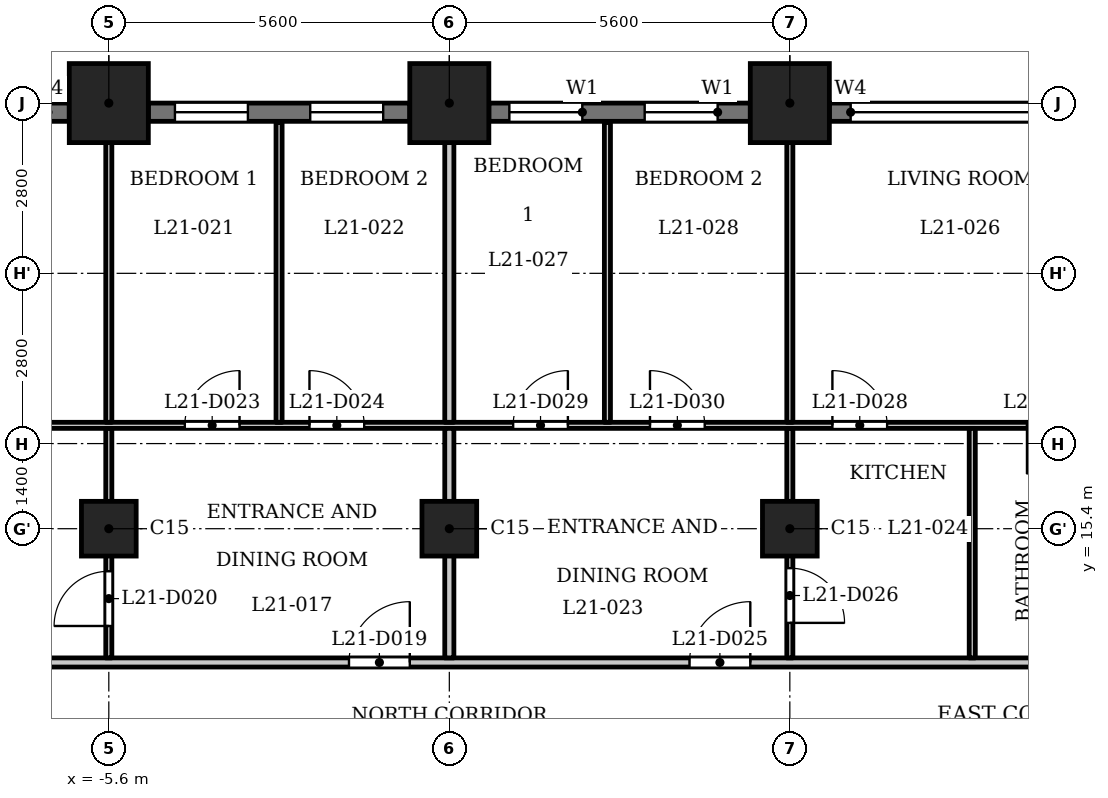
"""IFC4 building model, lengths in metres.
Left out: names, types, materials, properties, quantities, classifications, styles, units other than length and angle.
Written with IfcOpenShell. Run it as: python <this file> out.ifc"""

import sys

from ifc_helpers import new_model, si_unit, direction, frame, frame_2d, origin, origin_2d, place, context, subcontext, project, spatial, rectangle, extrude, element, fill, save


model = new_model("IFC4")
c1 = context("Model", 3, precision=1e-05, world=origin(), true_north=direction((0.0, 1.0)))
c2 = subcontext(c1, "Body", "Model", "MODEL_VIEW")
j1 = project(units=[si_unit("LENGTHUNIT", "METRE"), si_unit("PLANEANGLEUNIT", "RADIAN")], contexts=[c1])
p1 = place(None, origin())
s1 = spatial("IfcSite", under=j1, at=p1, CompositionType="ELEMENT")
p2 = place(p1, origin())
s2 = spatial("IfcBuilding", under=s1, at=p2, CompositionType="ELEMENT")
p3 = place(p2, frame((0.0, 0.0, 86.8)))
s3 = spatial("IfcBuildingStorey", under=s2, at=p3, CompositionType="ELEMENT", Elevation=86.8)
for number, where, z_axis, x_axis in (
    (1, (5.6, 22.4, 0.0), (0.0, 0.0, 1.0), (1.0, 0.0, 0.0)),
    (2, (0.0, 22.4, 0.0), (0.0, 0.0, 1.0), (1.0, 0.0, 0.0)),
    (3, (-5.6, 22.4, 0.0), (0.0, 0.0, 1.0), (1.0, 0.0, 0.0)),
):
    element("IfcColumn", number, at=place(p3, frame(where, z_axis=z_axis, x_axis=x_axis)), inside=s3, PredefinedType="COLUMN", context=c2, shape_type="SweptSolid", body=[
        extrude(rectangle(XDim=1.3, YDim=1.3, at=origin_2d()), origin(), (0.0, 0.0, 1.0), 3.5),
    ])
for number, where, z_axis, x_axis in (
    (4, (-5.6, 15.4, 0.0), (0.0, 0.0, 1.0), (1.0, 0.0, 0.0)),
    (5, (0.0, 15.4, 0.0), (0.0, 0.0, 1.0), (1.0, 0.0, 0.0)),
    (6, (5.6, 15.4, 0.0), (0.0, 0.0, 1.0), (1.0, 0.0, 0.0)),
):
    element("IfcColumn", number, at=place(p3, frame(where, z_axis=z_axis, x_axis=x_axis)), inside=s3, PredefinedType="COLUMN", context=c2, shape_type="SweptSolid", body=[
        extrude(rectangle(XDim=0.9, YDim=0.9, at=origin_2d()), origin(), (0.0, 0.0, 1.0), 3.5),
    ])
p4 = place(p3, frame((10.55, 22.25, 0.0), z_axis=(0.0, 0.0, 1.0), x_axis=(-1.0, 0.0, 0.0)))
e7 = element("IfcWall", 7, at=p4, inside=s3, PredefinedType="SOLIDWALL", context=c2, shape_type="SweptSolid", body=[
    extrude(rectangle(XDim=4.3, YDim=0.3, at=frame_2d((2.15, 0.0))), origin(), (0.0, 0.0, 1.0), 2.4),
])
p5 = place(p4, frame((0.35, 0.0, 1.2)))
e8 = element("IfcOpeningElement", 8, at=p5, cuts=e7, PredefinedType="OPENING", context=c2, shape_type="SweptSolid", body=[
    extrude(rectangle(XDim=3.6, YDim=0.95, at=frame_2d((1.8, 0.475))), frame((0.0, 0.16, 0.0), z_axis=(0.0, -1.0, 0.0), x_axis=(1.0, 0.0, 0.0)), (0.0, 0.0, 1.0), 0.32),
])
p6 = place(p3, frame((4.95, 22.25, 0.0), z_axis=(0.0, 0.0, 1.0), x_axis=(-1.0, 0.0, 0.0)))
e9 = element("IfcWall", 9, at=p6, inside=s3, PredefinedType="SOLIDWALL", context=c2, shape_type="SweptSolid", body=[
    extrude(rectangle(XDim=4.3, YDim=0.3, at=frame_2d((2.15, 0.0))), origin(), (0.0, 0.0, 1.0), 2.4),
])
p7 = place(p6, frame((0.538, 0.0, 0.6)))
e10 = element("IfcOpeningElement", 10, at=p7, cuts=e9, PredefinedType="OPENING", context=c2, shape_type="SweptSolid", body=[
    extrude(rectangle(XDim=1.2, YDim=1.55, at=frame_2d((0.6, 0.775))), frame((0.0, 0.16, 0.0), z_axis=(0.0, -1.0, 0.0), x_axis=(1.0, 0.0, 0.0)), (0.0, 0.0, 1.0), 0.32),
])
p8 = place(p6, frame((2.762, 0.0, 0.6)))
e11 = element("IfcOpeningElement", 11, at=p8, cuts=e9, PredefinedType="OPENING", context=c2, shape_type="SweptSolid", body=[
    extrude(rectangle(XDim=1.2, YDim=1.55, at=frame_2d((0.6, 0.775))), frame((0.0, 0.16, 0.0), z_axis=(0.0, -1.0, 0.0), x_axis=(1.0, 0.0, 0.0)), (0.0, 0.0, 1.0), 0.32),
])
p9 = place(p3, frame((-0.65, 22.25, 0.0), z_axis=(0.0, 0.0, 1.0), x_axis=(-1.0, 0.0, 0.0)))
e12 = element("IfcWall", 12, at=p9, inside=s3, PredefinedType="SOLIDWALL", context=c2, shape_type="SweptSolid", body=[
    extrude(rectangle(XDim=4.3, YDim=0.3, at=frame_2d((2.15, 0.0))), origin(), (0.0, 0.0, 1.0), 2.4),
])
p10 = place(p9, frame((0.438, 0.0, 0.6)))
e13 = element("IfcOpeningElement", 13, at=p10, cuts=e12, PredefinedType="OPENING", context=c2, shape_type="SweptSolid", body=[
    extrude(rectangle(XDim=1.2, YDim=1.55, at=frame_2d((0.6, 0.775))), frame((0.0, 0.16, 0.0), z_axis=(0.0, -1.0, 0.0), x_axis=(1.0, 0.0, 0.0)), (0.0, 0.0, 1.0), 0.32),
])
p11 = place(p9, frame((2.663, 0.0, 0.6)))
e14 = element("IfcOpeningElement", 14, at=p11, cuts=e12, PredefinedType="OPENING", context=c2, shape_type="SweptSolid", body=[
    extrude(rectangle(XDim=1.2, YDim=1.55, at=frame_2d((0.6, 0.775))), frame((0.0, 0.16, 0.0), z_axis=(0.0, -1.0, 0.0), x_axis=(1.0, 0.0, 0.0)), (0.0, 0.0, 1.0), 0.32),
])
p12 = place(p3, frame((-6.25, 22.25, 0.0), z_axis=(0.0, 0.0, 1.0), x_axis=(-1.0, 0.0, 0.0)))
e15 = element("IfcWall", 15, at=p12, inside=s3, PredefinedType="SOLIDWALL", context=c2, shape_type="SweptSolid", body=[
    extrude(rectangle(XDim=4.3, YDim=0.3, at=frame_2d((2.15, 0.0))), origin(), (0.0, 0.0, 1.0), 2.4),
])
p13 = place(p12, frame((0.35, 0.0, 1.2)))
e16 = element("IfcOpeningElement", 16, at=p13, cuts=e15, PredefinedType="OPENING", context=c2, shape_type="SweptSolid", body=[
    extrude(rectangle(XDim=3.6, YDim=0.95, at=frame_2d((1.8, 0.475))), frame((0.0, 0.16, 0.0), z_axis=(0.0, -1.0, 0.0), x_axis=(1.0, 0.0, 0.0)), (0.0, 0.0, 1.0), 0.32),
])
p14 = place(p3, frame((-17.4, 13.2, 0.0), z_axis=(0.0, 0.0, 1.0), x_axis=(1.0, 0.0, 0.0)))
e17 = element("IfcWall", 17, at=p14, inside=s3, PredefinedType="PARTITIONING", context=c2, shape_type="SweptSolid", body=[
    extrude(rectangle(XDim=34.8, YDim=0.15, at=frame_2d((17.4, 0.0))), origin(), (0.0, 0.0, 1.0), 3.2),
])
p15 = place(p14, frame((0.25, 0.0, 0.0)))
e18 = element("IfcOpeningElement", 18, at=p15, cuts=e17, PredefinedType="OPENING", context=c2, shape_type="SweptSolid", body=[
    extrude(rectangle(XDim=1.0, YDim=2.1, at=frame_2d((0.5, 1.05))), frame((0.0, 0.085, 0.0), z_axis=(0.0, -1.0, 0.0), x_axis=(1.0, 0.0, 0.0)), (0.0, 0.0, 1.0), 0.17),
])
p16 = place(p14, frame((33.65, 0.0, 0.0)))
e19 = element("IfcOpeningElement", 19, at=p16, cuts=e17, PredefinedType="OPENING", context=c2, shape_type="SweptSolid", body=[
    extrude(rectangle(XDim=1.0, YDim=2.1, at=frame_2d((0.5, 1.05))), frame((0.0, 0.085, 0.0), z_axis=(0.0, -1.0, 0.0), x_axis=(1.0, 0.0, 0.0)), (0.0, 0.0, 1.0), 0.17),
])
p17 = place(p14, frame((15.75, 0.0, 0.0)))
e20 = element("IfcOpeningElement", 20, at=p17, cuts=e17, PredefinedType="OPENING", context=c2, shape_type="SweptSolid", body=[
    extrude(rectangle(XDim=1.0, YDim=2.1, at=frame_2d((0.5, 1.05))), frame((0.0, 0.085, 0.0), z_axis=(0.0, -1.0, 0.0), x_axis=(1.0, 0.0, 0.0)), (0.0, 0.0, 1.0), 0.17),
])
p18 = place(p14, frame((21.35, 0.0, 0.0)))
e21 = element("IfcOpeningElement", 21, at=p18, cuts=e17, PredefinedType="OPENING", context=c2, shape_type="SweptSolid", body=[
    extrude(rectangle(XDim=1.0, YDim=2.1, at=frame_2d((0.5, 1.05))), frame((0.0, 0.085, 0.0), z_axis=(0.0, -1.0, 0.0), x_axis=(1.0, 0.0, 0.0)), (0.0, 0.0, 1.0), 0.17),
])
p19 = place(p3, frame((-16.725, 17.1, 0.0), z_axis=(0.0, 0.0, 1.0), x_axis=(1.0, 0.0, 0.0)))
e22 = element("IfcWall", 22, at=p19, inside=s3, PredefinedType="PARTITIONING", context=c2, shape_type="SweptSolid", body=[
    extrude(rectangle(XDim=33.45, YDim=0.1, at=frame_2d((16.725, 0.0))), origin(), (0.0, 0.0, 1.0), 3.2),
])
p20 = place(p19, frame((3.925, 0.0, 0.0)))
e23 = element("IfcOpeningElement", 23, at=p20, cuts=e22, PredefinedType="OPENING", context=c2, shape_type="SweptSolid", body=[
    extrude(rectangle(XDim=0.8, YDim=2.1, at=frame_2d((0.4, 1.05))), frame((0.0, 0.06, 0.0), z_axis=(0.0, -1.0, 0.0), x_axis=(1.0, 0.0, 0.0)), (0.0, 0.0, 1.0), 0.12),
])
p21 = place(p19, frame((0.975, 0.0, 0.0)))
e24 = element("IfcOpeningElement", 24, at=p21, cuts=e22, PredefinedType="OPENING", context=c2, shape_type="SweptSolid", body=[
    extrude(rectangle(XDim=0.9, YDim=2.1, at=frame_2d((0.45, 1.05))), frame((0.0, 0.06, 0.0), z_axis=(0.0, -1.0, 0.0), x_axis=(1.0, 0.0, 0.0)), (0.0, 0.0, 1.0), 0.12),
])
p22 = place(p19, frame((6.425, 0.0, 0.0)))
e25 = element("IfcOpeningElement", 25, at=p22, cuts=e22, PredefinedType="OPENING", context=c2, shape_type="SweptSolid", body=[
    extrude(rectangle(XDim=0.8, YDim=2.1, at=frame_2d((0.4, 1.05))), frame((0.0, 0.06, 0.0), z_axis=(0.0, -1.0, 0.0), x_axis=(1.0, 0.0, 0.0)), (0.0, 0.0, 1.0), 0.12),
])
p23 = place(p19, frame((8.825, 0.0, 0.0)))
e26 = element("IfcOpeningElement", 26, at=p23, cuts=e22, PredefinedType="OPENING", context=c2, shape_type="SweptSolid", body=[
    extrude(rectangle(XDim=0.9, YDim=2.1, at=frame_2d((0.45, 1.05))), frame((0.0, 0.06, 0.0), z_axis=(0.0, -1.0, 0.0), x_axis=(1.0, 0.0, 0.0)), (0.0, 0.0, 1.0), 0.12),
])
p24 = place(p19, frame((12.375, 0.0, 0.0)))
e27 = element("IfcOpeningElement", 27, at=p24, cuts=e22, PredefinedType="OPENING", context=c2, shape_type="SweptSolid", body=[
    extrude(rectangle(XDim=0.9, YDim=2.1, at=frame_2d((0.45, 1.05))), frame((0.0, 0.06, 0.0), z_axis=(0.0, -1.0, 0.0), x_axis=(1.0, 0.0, 0.0)), (0.0, 0.0, 1.0), 0.12),
])
p25 = place(p19, frame((14.425, 0.0, 0.0)))
e28 = element("IfcOpeningElement", 28, at=p25, cuts=e22, PredefinedType="OPENING", context=c2, shape_type="SweptSolid", body=[
    extrude(rectangle(XDim=0.9, YDim=2.1, at=frame_2d((0.45, 1.05))), frame((0.0, 0.06, 0.0), z_axis=(0.0, -1.0, 0.0), x_axis=(1.0, 0.0, 0.0)), (0.0, 0.0, 1.0), 0.12),
])
p26 = place(p19, frame((26.225, 0.0, 0.0)))
e29 = element("IfcOpeningElement", 29, at=p26, cuts=e22, PredefinedType="OPENING", context=c2, shape_type="SweptSolid", body=[
    extrude(rectangle(XDim=0.8, YDim=2.1, at=frame_2d((0.4, 1.05))), frame((0.0, 0.06, 0.0), z_axis=(0.0, -1.0, 0.0), x_axis=(1.0, 0.0, 0.0)), (0.0, 0.0, 1.0), 0.12),
])
p27 = place(p19, frame((23.025, 0.0, 0.0)))
e30 = element("IfcOpeningElement", 30, at=p27, cuts=e22, PredefinedType="OPENING", context=c2, shape_type="SweptSolid", body=[
    extrude(rectangle(XDim=0.9, YDim=2.1, at=frame_2d((0.45, 1.05))), frame((0.0, 0.06, 0.0), z_axis=(0.0, -1.0, 0.0), x_axis=(1.0, 0.0, 0.0)), (0.0, 0.0, 1.0), 0.12),
])
p28 = place(p19, frame((17.775, 0.0, 0.0)))
e31 = element("IfcOpeningElement", 31, at=p28, cuts=e22, PredefinedType="OPENING", context=c2, shape_type="SweptSolid", body=[
    extrude(rectangle(XDim=0.9, YDim=2.1, at=frame_2d((0.45, 1.05))), frame((0.0, 0.06, 0.0), z_axis=(0.0, -1.0, 0.0), x_axis=(1.0, 0.0, 0.0)), (0.0, 0.0, 1.0), 0.12),
])
p29 = place(p19, frame((20.025, 0.0, 0.0)))
e32 = element("IfcOpeningElement", 32, at=p29, cuts=e22, PredefinedType="OPENING", context=c2, shape_type="SweptSolid", body=[
    extrude(rectangle(XDim=0.9, YDim=2.1, at=frame_2d((0.45, 1.05))), frame((0.0, 0.06, 0.0), z_axis=(0.0, -1.0, 0.0), x_axis=(1.0, 0.0, 0.0)), (0.0, 0.0, 1.0), 0.12),
])
p30 = place(p19, frame((28.825, 0.0, 0.0)))
e33 = element("IfcOpeningElement", 33, at=p30, cuts=e22, PredefinedType="OPENING", context=c2, shape_type="SweptSolid", body=[
    extrude(rectangle(XDim=0.8, YDim=2.1, at=frame_2d((0.4, 1.05))), frame((0.0, 0.06, 0.0), z_axis=(0.0, -1.0, 0.0), x_axis=(1.0, 0.0, 0.0)), (0.0, 0.0, 1.0), 0.12),
])
p31 = place(p19, frame((31.975, 0.0, 0.0)))
e34 = element("IfcOpeningElement", 34, at=p31, cuts=e22, PredefinedType="OPENING", context=c2, shape_type="SweptSolid", body=[
    extrude(rectangle(XDim=0.9, YDim=2.1, at=frame_2d((0.45, 1.05))), frame((0.0, 0.06, 0.0), z_axis=(0.0, -1.0, 0.0), x_axis=(1.0, 0.0, 0.0)), (0.0, 0.0, 1.0), 0.12),
])
p32 = place(p3, frame((-5.6, 13.275, 0.0), z_axis=(0.0, 0.0, 1.0), x_axis=(0.0, 1.0, 0.0)))
e35 = element("IfcWall", 35, at=p32, inside=s3, PredefinedType="PARTITIONING", context=c2, shape_type="SweptSolid", body=[
    extrude(rectangle(XDim=3.775, YDim=0.1, at=frame_2d((1.888, 0.0))), origin(), (0.0, 0.0, 1.0), 3.2),
])
p33 = place(p32, frame((0.525, 0.0, 0.0)))
e36 = element("IfcOpeningElement", 36, at=p33, cuts=e35, PredefinedType="OPENING", context=c2, shape_type="SweptSolid", body=[
    extrude(rectangle(XDim=0.9, YDim=2.1, at=frame_2d((0.45, 1.05))), frame((0.0, 0.06, 0.0), z_axis=(0.0, -1.0, 0.0), x_axis=(1.0, 0.0, 0.0)), (0.0, 0.0, 1.0), 0.12),
])
p34 = place(p3, frame((-5.6, 17.15, 0.0), z_axis=(0.0, 0.0, 1.0), x_axis=(0.0, 1.0, 0.0)))
e37 = element("IfcWall", 37, at=p34, inside=s3, PredefinedType="PARTITIONING", context=c2, shape_type="SweptSolid", body=[
    extrude(rectangle(XDim=5.88, YDim=0.1, at=frame_2d((2.94, 0.0))), origin(), (0.0, 0.0, 1.0), 3.2),
])
p35 = place(p3, frame((-2.8, 17.15, 0.0), z_axis=(0.0, 0.0, 1.0), x_axis=(0.0, 1.0, 0.0)))
e38 = element("IfcWall", 38, at=p35, inside=s3, PredefinedType="PARTITIONING", context=c2, shape_type="SweptSolid", body=[
    extrude(rectangle(XDim=4.93, YDim=0.1, at=frame_2d((2.465, 0.0))), origin(), (0.0, 0.0, 1.0), 3.2),
])
p36 = place(p3, frame((0.0, 13.275, 0.0), z_axis=(0.0, 0.0, 1.0), x_axis=(0.0, 1.0, 0.0)))
e39 = element("IfcWall", 39, at=p36, inside=s3, PredefinedType="PARTITIONING", context=c2, shape_type="SweptSolid", body=[
    extrude(rectangle(XDim=3.775, YDim=0.15, at=frame_2d((1.888, 0.0))), origin(), (0.0, 0.0, 1.0), 3.2),
])
p37 = place(p3, frame((0.0, 17.15, 0.0), z_axis=(0.0, 0.0, 1.0), x_axis=(0.0, 1.0, 0.0)))
e40 = element("IfcWall", 40, at=p37, inside=s3, PredefinedType="PARTITIONING", context=c2, shape_type="SweptSolid", body=[
    extrude(rectangle(XDim=5.88, YDim=0.15, at=frame_2d((2.94, 0.0))), origin(), (0.0, 0.0, 1.0), 3.2),
])
p38 = place(p3, frame((2.6, 17.15, 0.0), z_axis=(0.0, 0.0, 1.0), x_axis=(0.0, 1.0, 0.0)))
e41 = element("IfcWall", 41, at=p38, inside=s3, PredefinedType="PARTITIONING", context=c2, shape_type="SweptSolid", body=[
    extrude(rectangle(XDim=4.93, YDim=0.1, at=frame_2d((2.465, 0.0))), origin(), (0.0, 0.0, 1.0), 3.2),
])
p39 = place(p3, frame((5.6, 13.275, 0.0), z_axis=(0.0, 0.0, 1.0), x_axis=(0.0, 1.0, 0.0)))
e42 = element("IfcWall", 42, at=p39, inside=s3, PredefinedType="PARTITIONING", context=c2, shape_type="SweptSolid", body=[
    extrude(rectangle(XDim=3.775, YDim=0.1, at=frame_2d((1.888, 0.0))), origin(), (0.0, 0.0, 1.0), 3.2),
])
p40 = place(p39, frame((0.576, 0.0, 0.0)))
e43 = element("IfcOpeningElement", 43, at=p40, cuts=e42, PredefinedType="OPENING", context=c2, shape_type="SweptSolid", body=[
    extrude(rectangle(XDim=0.9, YDim=2.1, at=frame_2d((0.45, 1.05))), frame((0.0, 0.06, 0.0), z_axis=(0.0, -1.0, 0.0), x_axis=(1.0, 0.0, 0.0)), (0.0, 0.0, 1.0), 0.12),
])
p41 = place(p3, frame((5.6, 17.15, 0.0), z_axis=(0.0, 0.0, 1.0), x_axis=(0.0, 1.0, 0.0)))
e44 = element("IfcWall", 44, at=p41, inside=s3, PredefinedType="PARTITIONING", context=c2, shape_type="SweptSolid", body=[
    extrude(rectangle(XDim=5.88, YDim=0.1, at=frame_2d((2.94, 0.0))), origin(), (0.0, 0.0, 1.0), 3.2),
])
p42 = place(p3, frame((8.6, 13.275, 0.0), z_axis=(0.0, 0.0, 1.0), x_axis=(0.0, 1.0, 0.0)))
e45 = element("IfcWall", 45, at=p42, inside=s3, PredefinedType="PARTITIONING", context=c2, shape_type="SweptSolid", body=[
    extrude(rectangle(XDim=3.775, YDim=0.1, at=frame_2d((1.888, 0.0))), origin(), (0.0, 0.0, 1.0), 3.2),
])
p43 = place(p17, origin())
e46 = element("IfcDoor", 46, at=p43, inside=s3, OperationType="SINGLE_SWING_LEFT", PredefinedType="DOOR", context=c2, shape_type="SweptSolid", body=[
    extrude(rectangle(XDim=1.0, YDim=2.1, at=frame_2d((0.5, 1.05))), frame((0.0, 0.025, 0.0), z_axis=(0.0, -1.0, 0.0), x_axis=(1.0, 0.0, 0.0)), (0.0, 0.0, 1.0), 0.05),
])
fill(e20, e46)
p44 = place(p33, origin())
e47 = element("IfcDoor", 47, at=p44, inside=s3, OperationType="SINGLE_SWING_RIGHT", PredefinedType="DOOR", context=c2, shape_type="SweptSolid", body=[
    extrude(rectangle(XDim=0.9, YDim=2.1, at=frame_2d((0.45, 1.05))), frame((0.0, 0.025, 0.0), z_axis=(0.0, -1.0, 0.0), x_axis=(1.0, 0.0, 0.0)), (0.0, 0.0, 1.0), 0.05),
])
fill(e36, e47)
p45 = place(p24, origin())
e48 = element("IfcDoor", 48, at=p45, inside=s3, OperationType="SINGLE_SWING_LEFT", PredefinedType="DOOR", context=c2, shape_type="SweptSolid", body=[
    extrude(rectangle(XDim=0.9, YDim=2.1, at=frame_2d((0.45, 1.05))), frame((0.0, 0.025, 0.0), z_axis=(0.0, -1.0, 0.0), x_axis=(1.0, 0.0, 0.0)), (0.0, 0.0, 1.0), 0.05),
])
fill(e27, e48)
p46 = place(p25, origin())
e49 = element("IfcDoor", 49, at=p46, inside=s3, OperationType="SINGLE_SWING_RIGHT", PredefinedType="DOOR", context=c2, shape_type="SweptSolid", body=[
    extrude(rectangle(XDim=0.9, YDim=2.1, at=frame_2d((0.45, 1.05))), frame((0.0, 0.025, 0.0), z_axis=(0.0, -1.0, 0.0), x_axis=(1.0, 0.0, 0.0)), (0.0, 0.0, 1.0), 0.05),
])
fill(e28, e49)
p47 = place(p18, origin())
e50 = element("IfcDoor", 50, at=p47, inside=s3, OperationType="SINGLE_SWING_LEFT", PredefinedType="DOOR", context=c2, shape_type="SweptSolid", body=[
    extrude(rectangle(XDim=1.0, YDim=2.1, at=frame_2d((0.5, 1.05))), frame((0.0, 0.025, 0.0), z_axis=(0.0, -1.0, 0.0), x_axis=(1.0, 0.0, 0.0)), (0.0, 0.0, 1.0), 0.05),
])
fill(e21, e50)
p48 = place(p40, origin())
e51 = element("IfcDoor", 51, at=p48, inside=s3, OperationType="SINGLE_SWING_LEFT", PredefinedType="DOOR", context=c2, shape_type="SweptSolid", body=[
    extrude(rectangle(XDim=0.9, YDim=2.1, at=frame_2d((0.45, 1.05))), frame((0.0, 0.025, 0.0), z_axis=(0.0, -1.0, 0.0), x_axis=(1.0, 0.0, 0.0)), (0.0, 0.0, 1.0), 0.05),
])
fill(e43, e51)
p49 = place(p26, origin())
e52 = element("IfcDoor", 52, at=p49, inside=s3, OperationType="SINGLE_SWING_LEFT", PredefinedType="DOOR", context=c2, shape_type="SweptSolid", body=[
    extrude(rectangle(XDim=0.8, YDim=2.1, at=frame_2d((0.4, 1.05))), frame((0.0, 0.025, 0.0), z_axis=(0.0, -1.0, 0.0), x_axis=(1.0, 0.0, 0.0)), (0.0, 0.0, 1.0), 0.05),
])
fill(e29, e52)
p50 = place(p27, origin())
e53 = element("IfcDoor", 53, at=p50, inside=s3, OperationType="SINGLE_SWING_RIGHT", PredefinedType="DOOR", context=c2, shape_type="SweptSolid", body=[
    extrude(rectangle(XDim=0.9, YDim=2.1, at=frame_2d((0.45, 1.05))), frame((0.0, 0.025, 0.0), z_axis=(0.0, -1.0, 0.0), x_axis=(1.0, 0.0, 0.0)), (0.0, 0.0, 1.0), 0.05),
])
fill(e30, e53)
p51 = place(p28, origin())
e54 = element("IfcDoor", 54, at=p51, inside=s3, OperationType="SINGLE_SWING_LEFT", PredefinedType="DOOR", context=c2, shape_type="SweptSolid", body=[
    extrude(rectangle(XDim=0.9, YDim=2.1, at=frame_2d((0.45, 1.05))), frame((0.0, 0.025, 0.0), z_axis=(0.0, -1.0, 0.0), x_axis=(1.0, 0.0, 0.0)), (0.0, 0.0, 1.0), 0.05),
])
fill(e31, e54)
p52 = place(p29, origin())
e55 = element("IfcDoor", 55, at=p52, inside=s3, OperationType="SINGLE_SWING_RIGHT", PredefinedType="DOOR", context=c2, shape_type="SweptSolid", body=[
    extrude(rectangle(XDim=0.9, YDim=2.1, at=frame_2d((0.45, 1.05))), frame((0.0, 0.025, 0.0), z_axis=(0.0, -1.0, 0.0), x_axis=(1.0, 0.0, 0.0)), (0.0, 0.0, 1.0), 0.05),
])
fill(e32, e55)
p53 = place(p5, origin())
e56 = element("IfcWindow", 56, at=p53, inside=s3, PartitioningType="SINGLE_PANEL", PredefinedType="WINDOW", context=c2, shape_type="SweptSolid", body=[
    extrude(rectangle(XDim=3.6, YDim=0.95, at=frame_2d((1.8, 0.475))), frame((0.0, 0.03, 0.0), z_axis=(0.0, -1.0, 0.0), x_axis=(1.0, 0.0, 0.0)), (0.0, 0.0, 1.0), 0.06),
])
fill(e8, e56)
p54 = place(p7, origin())
e57 = element("IfcWindow", 57, at=p54, inside=s3, PartitioningType="SINGLE_PANEL", PredefinedType="WINDOW", context=c2, shape_type="SweptSolid", body=[
    extrude(rectangle(XDim=1.2, YDim=1.55, at=frame_2d((0.6, 0.775))), frame((0.0, 0.03, 0.0), z_axis=(0.0, -1.0, 0.0), x_axis=(1.0, 0.0, 0.0)), (0.0, 0.0, 1.0), 0.06),
])
fill(e10, e57)
p55 = place(p8, origin())
e58 = element("IfcWindow", 58, at=p55, inside=s3, PartitioningType="SINGLE_PANEL", PredefinedType="WINDOW", context=c2, shape_type="SweptSolid", body=[
    extrude(rectangle(XDim=1.2, YDim=1.55, at=frame_2d((0.6, 0.775))), frame((0.0, 0.03, 0.0), z_axis=(0.0, -1.0, 0.0), x_axis=(1.0, 0.0, 0.0)), (0.0, 0.0, 1.0), 0.06),
])
fill(e11, e58)
p56 = place(p10, origin())
e59 = element("IfcWindow", 59, at=p56, inside=s3, PartitioningType="SINGLE_PANEL", PredefinedType="WINDOW", context=c2, shape_type="SweptSolid", body=[
    extrude(rectangle(XDim=1.2, YDim=1.55, at=frame_2d((0.6, 0.775))), frame((0.0, 0.03, 0.0), z_axis=(0.0, -1.0, 0.0), x_axis=(1.0, 0.0, 0.0)), (0.0, 0.0, 1.0), 0.06),
])
fill(e13, e59)
p57 = place(p11, origin())
e60 = element("IfcWindow", 60, at=p57, inside=s3, PartitioningType="SINGLE_PANEL", PredefinedType="WINDOW", context=c2, shape_type="SweptSolid", body=[
    extrude(rectangle(XDim=1.2, YDim=1.55, at=frame_2d((0.6, 0.775))), frame((0.0, 0.03, 0.0), z_axis=(0.0, -1.0, 0.0), x_axis=(1.0, 0.0, 0.0)), (0.0, 0.0, 1.0), 0.06),
])
fill(e14, e60)
save(model, sys.argv[1])
